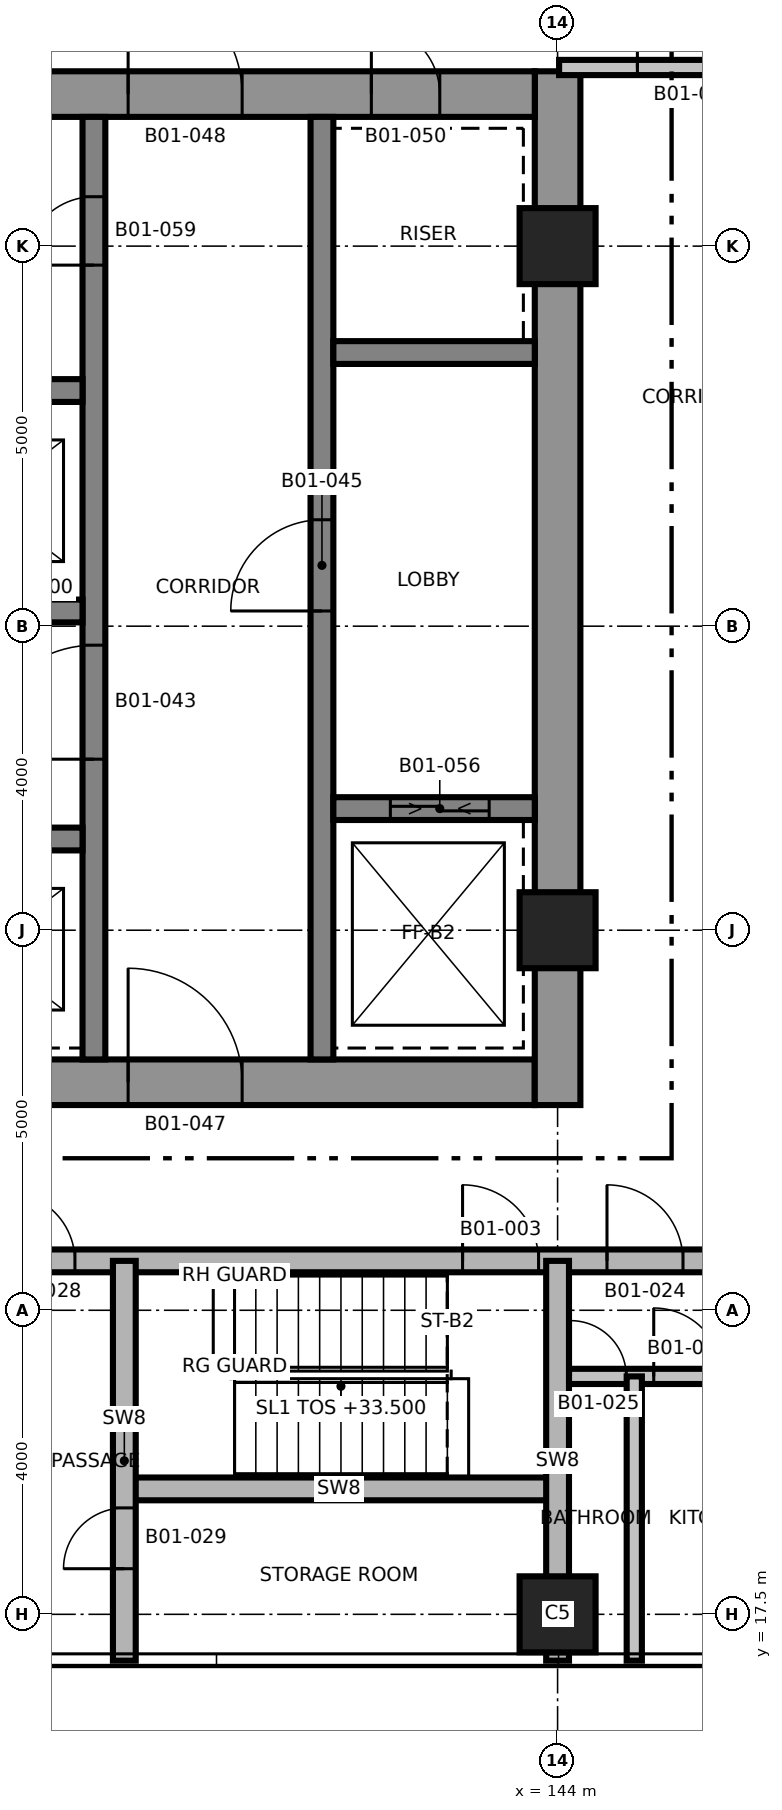
"""IFC4 building model, lengths in metres.
Left out: names, types, materials, properties, quantities, classifications, styles, units other than length and angle.
Written with IfcOpenShell. Run it as: python <this file> out.ifc"""

import sys

from ifc_helpers import new_model, si_unit, direction, frame, frame_2d, origin, origin_2d, place, context, subcontext, project, spatial, rectangle, extrude, element, fill, save


model = new_model("IFC4")
c1 = context("Model", 3, precision=1e-05, world=origin(), true_north=direction((0.0, 1.0)))
c2 = subcontext(c1, "Body", "Model", "MODEL_VIEW")
j1 = project(units=[si_unit("LENGTHUNIT", "METRE"), si_unit("PLANEANGLEUNIT", "RADIAN")], contexts=[c1])
p1 = place(None, origin())
s1 = spatial("IfcSite", under=j1, at=p1, CompositionType="ELEMENT")
p2 = place(p1, origin())
s2 = spatial("IfcBuilding", under=s1, at=p2, CompositionType="ELEMENT")
p3 = place(p2, frame((0.0, 0.0, 33.5)))
s3 = spatial("IfcBuildingStorey", under=s2, at=p3, CompositionType="ELEMENT", Elevation=33.5)
p4 = place(p3, frame((128.7, 24.5, 0.0), z_axis=(0.0, 0.0, 1.0), x_axis=(1.0, 0.0, 0.0)))
e1 = element("IfcWall", 1, at=p4, inside=s3, PredefinedType="SHEAR", context=c2, shape_type="SweptSolid", body=[
    extrude(rectangle(XDim=15.0, YDim=0.6, at=frame_2d((7.5, 0.0))), origin(), (0.0, 0.0, 1.0), 3.7),
])
p5 = place(p4, frame((9.65, 0.0, 0.0)))
e2 = element("IfcOpeningElement", 2, at=p5, cuts=e1, PredefinedType="OPENING", context=c2, shape_type="SweptSolid", body=[
    extrude(rectangle(XDim=1.5, YDim=2.1, at=frame_2d((0.75, 1.05))), frame((0.0, 0.31, 0.0), z_axis=(0.0, -1.0, 0.0), x_axis=(1.0, 0.0, 0.0)), (0.0, 0.0, 1.0), 0.62),
])
p6 = place(p4, frame((1.25, 0.0, 0.0)))
e3 = element("IfcOpeningElement", 3, at=p6, cuts=e1, PredefinedType="OPENING", context=c2, shape_type="SweptSolid", body=[
    extrude(rectangle(XDim=0.9, YDim=2.1, at=frame_2d((0.45, 1.05))), frame((0.0, 0.31, 0.0), z_axis=(0.0, -1.0, 0.0), x_axis=(1.0, 0.0, 0.0)), (0.0, 0.0, 1.0), 0.62),
])
p7 = place(p3, frame((144.0, 24.2, 0.0), z_axis=(0.0, 0.0, 1.0), x_axis=(0.0, 1.0, 0.0)))
e4 = element("IfcWall", 4, at=p7, inside=s3, PredefinedType="SHEAR", context=c2, shape_type="SweptSolid", body=[
    extrude(rectangle(XDim=13.6, YDim=0.6, at=frame_2d((6.8, 0.0))), origin(), (0.0, 0.0, 1.0), 3.7),
])
p8 = place(p3, frame((128.7, 37.5, 0.0), z_axis=(0.0, 0.0, 1.0), x_axis=(1.0, 0.0, 0.0)))
e5 = element("IfcWall", 5, at=p8, inside=s3, PredefinedType="SHEAR", context=c2, shape_type="SweptSolid", body=[
    extrude(rectangle(XDim=15.0, YDim=0.6, at=frame_2d((7.5, 0.0))), origin(), (0.0, 0.0, 1.0), 3.7),
])
p9 = place(p8, frame((9.65, 0.0, 0.0)))
e6 = element("IfcOpeningElement", 6, at=p9, cuts=e5, PredefinedType="OPENING", context=c2, shape_type="SweptSolid", body=[
    extrude(rectangle(XDim=1.5, YDim=2.1, at=frame_2d((0.75, 1.05))), frame((0.0, 0.31, 0.0), z_axis=(0.0, -1.0, 0.0), x_axis=(1.0, 0.0, 0.0)), (0.0, 0.0, 1.0), 0.62),
])
p10 = place(p8, frame((12.85, 0.0, 0.0)))
e7 = element("IfcOpeningElement", 7, at=p10, cuts=e5, PredefinedType="OPENING", context=c2, shape_type="SweptSolid", body=[
    extrude(rectangle(XDim=0.9, YDim=2.1, at=frame_2d((0.45, 1.05))), frame((0.0, 0.31, 0.0), z_axis=(0.0, -1.0, 0.0), x_axis=(1.0, 0.0, 0.0)), (0.0, 0.0, 1.0), 0.62),
])
p11 = place(p8, frame((4.3, 0.0, 0.0)))
e8 = element("IfcOpeningElement", 8, at=p11, cuts=e5, PredefinedType="OPENING", context=c2, shape_type="SweptSolid", body=[
    extrude(rectangle(XDim=0.9, YDim=2.1, at=frame_2d((0.45, 1.05))), frame((0.0, 0.31, 0.0), z_axis=(0.0, -1.0, 0.0), x_axis=(1.0, 0.0, 0.0)), (0.0, 0.0, 1.0), 0.62),
])
p12 = place(p8, frame((7.2, 0.0, 0.0)))
e9 = element("IfcOpeningElement", 9, at=p12, cuts=e5, PredefinedType="OPENING", context=c2, shape_type="SweptSolid", body=[
    extrude(rectangle(XDim=0.9, YDim=2.1, at=frame_2d((0.45, 1.05))), frame((0.0, 0.31, 0.0), z_axis=(0.0, -1.0, 0.0), x_axis=(1.0, 0.0, 0.0)), (0.0, 0.0, 1.0), 0.62),
])
p13 = place(p3, frame((137.9, 24.8, 0.0), z_axis=(0.0, 0.0, 1.0), x_axis=(0.0, 1.0, 0.0)))
e10 = element("IfcWall", 10, at=p13, inside=s3, PredefinedType="SHEAR", context=c2, shape_type="SweptSolid", body=[
    extrude(rectangle(XDim=12.4, YDim=0.3, at=frame_2d((6.2, 0.0))), origin(), (0.0, 0.0, 1.0), 3.7),
])
p14 = place(p13, frame((3.95, 0.0, 0.0)))
e11 = element("IfcOpeningElement", 11, at=p14, cuts=e10, PredefinedType="OPENING", context=c2, shape_type="SweptSolid", body=[
    extrude(rectangle(XDim=1.5, YDim=2.1, at=frame_2d((0.75, 1.05))), frame((0.0, 0.16, 0.0), z_axis=(0.0, -1.0, 0.0), x_axis=(1.0, 0.0, 0.0)), (0.0, 0.0, 1.0), 0.32),
])
p15 = place(p13, frame((10.45, 0.0, 0.0)))
e12 = element("IfcOpeningElement", 12, at=p15, cuts=e10, PredefinedType="OPENING", context=c2, shape_type="SweptSolid", body=[
    extrude(rectangle(XDim=0.9, YDim=2.1, at=frame_2d((0.45, 1.05))), frame((0.0, 0.16, 0.0), z_axis=(0.0, -1.0, 0.0), x_axis=(1.0, 0.0, 0.0)), (0.0, 0.0, 1.0), 0.32),
])
p16 = place(p3, frame((140.9, 24.8, 0.0), z_axis=(0.0, 0.0, 1.0), x_axis=(0.0, 1.0, 0.0)))
e13 = element("IfcWall", 13, at=p16, inside=s3, PredefinedType="SHEAR", context=c2, shape_type="SweptSolid", body=[
    extrude(rectangle(XDim=12.4, YDim=0.3, at=frame_2d((6.2, 0.0))), origin(), (0.0, 0.0, 1.0), 3.7),
])
p17 = place(p16, frame((5.9, 0.0, 0.0)))
e14 = element("IfcOpeningElement", 14, at=p17, cuts=e13, PredefinedType="OPENING", context=c2, shape_type="SweptSolid", body=[
    extrude(rectangle(XDim=1.2, YDim=2.1, at=frame_2d((0.6, 1.05))), frame((0.0, 0.16, 0.0), z_axis=(0.0, -1.0, 0.0), x_axis=(1.0, 0.0, 0.0)), (0.0, 0.0, 1.0), 0.32),
])
p18 = place(p3, frame((132.25, 27.7, 0.0), z_axis=(0.0, 0.0, 1.0), x_axis=(1.0, 0.0, 0.0)))
e15 = element("IfcWall", 15, at=p18, inside=s3, PredefinedType="SHEAR", context=c2, shape_type="SweptSolid", body=[
    extrude(rectangle(XDim=5.5, YDim=0.3, at=frame_2d((2.75, 0.0))), origin(), (0.0, 0.0, 1.0), 3.7),
])
p19 = place(p18, frame((0.9, 0.0, 0.0)))
e16 = element("IfcOpeningElement", 16, at=p19, cuts=e15, PredefinedType="OPENING", context=c2, shape_type="SweptSolid", body=[
    extrude(rectangle(XDim=1.1, YDim=2.4, at=frame_2d((0.55, 1.2))), frame((0.0, 0.16, 0.0), z_axis=(0.0, -1.0, 0.0), x_axis=(1.0, 0.0, 0.0)), (0.0, 0.0, 1.0), 0.32),
])
p20 = place(p18, frame((3.8, 0.0, 0.0)))
e17 = element("IfcOpeningElement", 17, at=p20, cuts=e15, PredefinedType="OPENING", context=c2, shape_type="SweptSolid", body=[
    extrude(rectangle(XDim=1.1, YDim=2.4, at=frame_2d((0.55, 1.2))), frame((0.0, 0.16, 0.0), z_axis=(0.0, -1.0, 0.0), x_axis=(1.0, 0.0, 0.0)), (0.0, 0.0, 1.0), 0.32),
])
p21 = place(p3, frame((132.25, 30.7, 0.0), z_axis=(0.0, 0.0, 1.0), x_axis=(1.0, 0.0, 0.0)))
e18 = element("IfcWall", 18, at=p21, inside=s3, PredefinedType="SHEAR", context=c2, shape_type="SweptSolid", body=[
    extrude(rectangle(XDim=5.5, YDim=0.3, at=frame_2d((2.75, 0.0))), origin(), (0.0, 0.0, 1.0), 3.7),
])
p22 = place(p21, frame((0.9, 0.0, 0.0)))
e19 = element("IfcOpeningElement", 19, at=p22, cuts=e18, PredefinedType="OPENING", context=c2, shape_type="SweptSolid", body=[
    extrude(rectangle(XDim=1.1, YDim=2.4, at=frame_2d((0.55, 1.2))), frame((0.0, 0.16, 0.0), z_axis=(0.0, -1.0, 0.0), x_axis=(1.0, 0.0, 0.0)), (0.0, 0.0, 1.0), 0.32),
])
p23 = place(p21, frame((3.8, 0.0, 0.0)))
e20 = element("IfcOpeningElement", 20, at=p23, cuts=e18, PredefinedType="OPENING", context=c2, shape_type="SweptSolid", body=[
    extrude(rectangle(XDim=1.1, YDim=2.4, at=frame_2d((0.55, 1.2))), frame((0.0, 0.16, 0.0), z_axis=(0.0, -1.0, 0.0), x_axis=(1.0, 0.0, 0.0)), (0.0, 0.0, 1.0), 0.32),
])
p24 = place(p3, frame((132.25, 33.6, 0.0), z_axis=(0.0, 0.0, 1.0), x_axis=(1.0, 0.0, 0.0)))
e21 = element("IfcWall", 21, at=p24, inside=s3, PredefinedType="SHEAR", context=c2, shape_type="SweptSolid", body=[
    extrude(rectangle(XDim=5.5, YDim=0.3, at=frame_2d((2.75, 0.0))), origin(), (0.0, 0.0, 1.0), 3.7),
])
p25 = place(p3, frame((141.05, 28.1, 0.0), z_axis=(0.0, 0.0, 1.0), x_axis=(1.0, 0.0, 0.0)))
e22 = element("IfcWall", 22, at=p25, inside=s3, PredefinedType="SHEAR", context=c2, shape_type="SweptSolid", body=[
    extrude(rectangle(XDim=2.65, YDim=0.3, at=frame_2d((1.325, 0.0))), origin(), (0.0, 0.0, 1.0), 3.7),
])
p26 = place(p25, frame((0.75, 0.0, 0.0)))
e23 = element("IfcOpeningElement", 23, at=p26, cuts=e22, PredefinedType="OPENING", context=c2, shape_type="SweptSolid", body=[
    extrude(rectangle(XDim=1.3, YDim=2.4, at=frame_2d((0.65, 1.2))), frame((0.0, 0.16, 0.0), z_axis=(0.0, -1.0, 0.0), x_axis=(1.0, 0.0, 0.0)), (0.0, 0.0, 1.0), 0.32),
])
p27 = place(p3, frame((141.05, 34.1, 0.0), z_axis=(0.0, 0.0, 1.0), x_axis=(1.0, 0.0, 0.0)))
e24 = element("IfcWall", 24, at=p27, inside=s3, PredefinedType="SHEAR", context=c2, shape_type="SweptSolid", body=[
    extrude(rectangle(XDim=2.65, YDim=0.3, at=frame_2d((1.325, 0.0))), origin(), (0.0, 0.0, 1.0), 3.7),
])
for number, where, z_axis, x_axis in (
    (25, (144.0, 17.5, 0.0), (0.0, 0.0, 1.0), (1.0, 0.0, 0.0)),
    (26, (144.0, 26.5, 0.0), (0.0, 0.0, 1.0), (1.0, 0.0, 0.0)),
    (27, (144.0, 35.5, 0.0), (0.0, 0.0, 1.0), (1.0, 0.0, 0.0)),
):
    element("IfcColumn", number, at=place(p3, frame(where, z_axis=z_axis, x_axis=x_axis)), inside=s3, PredefinedType="COLUMN", context=c2, shape_type="SweptSolid", body=[
        extrude(rectangle(XDim=1.0, YDim=1.0, at=origin_2d()), origin(), (0.0, 0.0, 1.0), 3.7),
    ])
p28 = place(p3, frame((138.25, 19.15, 0.0), z_axis=(0.0, 0.0, 1.0), x_axis=(1.0, 0.0, 0.0)))
e28 = element("IfcWall", 28, at=p28, inside=s3, PredefinedType="SHEAR", context=c2, shape_type="SweptSolid", body=[
    extrude(rectangle(XDim=5.75, YDim=0.3, at=frame_2d((2.875, 0.0))), origin(), (0.0, 0.0, 1.0), 3.4),
])
p29 = place(p3, frame((144.0, 20.63, 0.0), z_axis=(0.0, 0.0, 1.0), x_axis=(1.0, 0.0, 0.0)))
e29 = element("IfcWall", 29, at=p29, inside=s3, PredefinedType="PARTITIONING", context=c2, shape_type="SweptSolid", body=[
    extrude(rectangle(XDim=7.892, YDim=0.2, at=frame_2d((3.946, 0.0))), origin(), (0.0, 0.0, 1.0), 3.4),
])
p30 = place(p29, frame((0.17, 0.0, 0.0)))
e30 = element("IfcOpeningElement", 30, at=p30, cuts=e29, PredefinedType="OPENING", context=c2, shape_type="SweptSolid", body=[
    extrude(rectangle(XDim=0.734, YDim=2.1, at=frame_2d((0.367, 1.05))), frame((0.0, 0.11, 0.0), z_axis=(0.0, -1.0, 0.0), x_axis=(1.0, 0.0, 0.0)), (0.0, 0.0, 1.0), 0.22),
])
p31 = place(p29, frame((1.265, 0.0, 0.0)))
e31 = element("IfcOpeningElement", 31, at=p31, cuts=e29, PredefinedType="OPENING", context=c2, shape_type="SweptSolid", body=[
    extrude(rectangle(XDim=0.9, YDim=2.1, at=frame_2d((0.45, 1.05))), frame((0.0, 0.11, 0.0), z_axis=(0.0, -1.0, 0.0), x_axis=(1.0, 0.0, 0.0)), (0.0, 0.0, 1.0), 0.22),
])
p32 = place(p29, frame((4.708, 0.0, 0.0)))
e32 = element("IfcOpeningElement", 32, at=p32, cuts=e29, PredefinedType="OPENING", context=c2, shape_type="SweptSolid", body=[
    extrude(rectangle(XDim=0.9, YDim=2.1, at=frame_2d((0.45, 1.05))), frame((0.0, 0.11, 0.0), z_axis=(0.0, -1.0, 0.0), x_axis=(1.0, 0.0, 0.0)), (0.0, 0.0, 1.0), 0.22),
])
p33 = place(p3, frame((120.89, 22.15, 0.0), z_axis=(0.0, 0.0, 1.0), x_axis=(1.0, 0.0, 0.0)))
e33 = element("IfcWall", 33, at=p33, inside=s3, PredefinedType="SHEAR", context=c2, shape_type="SweptSolid", body=[
    extrude(rectangle(XDim=31.22, YDim=0.3, at=frame_2d((15.61, 0.0))), origin(), (0.0, 0.0, 1.0), 3.4),
])
p34 = place(p33, frame((21.86, 0.0, 0.0)))
e34 = element("IfcOpeningElement", 34, at=p34, cuts=e33, PredefinedType="OPENING", context=c2, shape_type="SweptSolid", body=[
    extrude(rectangle(XDim=1.0, YDim=2.1, at=frame_2d((0.5, 1.05))), frame((0.0, 0.16, 0.0), z_axis=(0.0, -1.0, 0.0), x_axis=(1.0, 0.0, 0.0)), (0.0, 0.0, 1.0), 0.32),
])
p35 = place(p33, frame((6.46, 0.0, 0.0)))
e35 = element("IfcOpeningElement", 35, at=p35, cuts=e33, PredefinedType="OPENING", context=c2, shape_type="SweptSolid", body=[
    extrude(rectangle(XDim=1.0, YDim=2.1, at=frame_2d((0.5, 1.05))), frame((0.0, 0.16, 0.0), z_axis=(0.0, -1.0, 0.0), x_axis=(1.0, 0.0, 0.0)), (0.0, 0.0, 1.0), 0.32),
])
p36 = place(p33, frame((11.36, 0.0, 0.0)))
e36 = element("IfcOpeningElement", 36, at=p36, cuts=e33, PredefinedType="OPENING", context=c2, shape_type="SweptSolid", body=[
    extrude(rectangle(XDim=1.0, YDim=2.1, at=frame_2d((0.5, 1.05))), frame((0.0, 0.16, 0.0), z_axis=(0.0, -1.0, 0.0), x_axis=(1.0, 0.0, 0.0)), (0.0, 0.0, 1.0), 0.32),
])
p37 = place(p33, frame((23.76, 0.0, 0.0)))
e37 = element("IfcOpeningElement", 37, at=p37, cuts=e33, PredefinedType="OPENING", context=c2, shape_type="SweptSolid", body=[
    extrude(rectangle(XDim=1.0, YDim=2.1, at=frame_2d((0.5, 1.05))), frame((0.0, 0.16, 0.0), z_axis=(0.0, -1.0, 0.0), x_axis=(1.0, 0.0, 0.0)), (0.0, 0.0, 1.0), 0.32),
])
p38 = place(p33, frame((15.86, 0.0, 0.0)))
e38 = element("IfcOpeningElement", 38, at=p38, cuts=e33, PredefinedType="OPENING", context=c2, shape_type="SweptSolid", body=[
    extrude(rectangle(XDim=0.9, YDim=2.1, at=frame_2d((0.45, 1.05))), frame((0.0, 0.16, 0.0), z_axis=(0.0, -1.0, 0.0), x_axis=(1.0, 0.0, 0.0)), (0.0, 0.0, 1.0), 0.32),
])
p39 = place(p3, frame((144.02, 37.85, 0.0), z_axis=(0.0, 0.0, 1.0), x_axis=(1.0, 0.0, 0.0)))
e39 = element("IfcWall", 39, at=p39, inside=s3, PredefinedType="PARTITIONING", context=c2, shape_type="SweptSolid", body=[
    extrude(rectangle(XDim=3.23, YDim=0.2, at=frame_2d((1.615, 0.0))), origin(), (0.0, 0.0, 1.0), 3.4),
])
p40 = place(p39, frame((1.03, 0.0, 0.0)))
e40 = element("IfcOpeningElement", 40, at=p40, cuts=e39, PredefinedType="OPENING", context=c2, shape_type="SweptSolid", body=[
    extrude(rectangle(XDim=1.5, YDim=2.1, at=frame_2d((0.75, 1.05))), frame((0.0, 0.11, 0.0), z_axis=(0.0, -1.0, 0.0), x_axis=(1.0, 0.0, 0.0)), (0.0, 0.0, 1.0), 0.22),
])
p41 = place(p3, frame((138.3, 16.89, 0.0), z_axis=(0.0, 0.0, 1.0), x_axis=(0.0, 1.0, 0.0)))
e41 = element("IfcWall", 41, at=p41, inside=s3, PredefinedType="SHEAR", context=c2, shape_type="SweptSolid", body=[
    extrude(rectangle(XDim=5.26, YDim=0.3, at=frame_2d((2.63, 0.0))), origin(), (0.0, 0.0, 1.0), 3.4),
])
p42 = place(p41, frame((1.21, 0.0, 0.0)))
e42 = element("IfcOpeningElement", 42, at=p42, cuts=e41, PredefinedType="OPENING", context=c2, shape_type="SweptSolid", body=[
    extrude(rectangle(XDim=0.8, YDim=2.1, at=frame_2d((0.4, 1.05))), frame((0.0, 0.16, 0.0), z_axis=(0.0, -1.0, 0.0), x_axis=(1.0, 0.0, 0.0)), (0.0, 0.0, 1.0), 0.32),
])
p43 = place(p3, frame((144.0, 16.89, 0.0), z_axis=(0.0, 0.0, 1.0), x_axis=(0.0, 1.0, 0.0)))
e43 = element("IfcWall", 43, at=p43, inside=s3, PredefinedType="SHEAR", context=c2, shape_type="SweptSolid", body=[
    extrude(rectangle(XDim=5.26, YDim=0.3, at=frame_2d((2.63, 0.0))), origin(), (0.0, 0.0, 1.0), 3.4),
])
p44 = place(p3, frame((145.009, 16.89, 0.0), z_axis=(0.0, 0.0, 1.0), x_axis=(0.0, 1.0, 0.0)))
e44 = element("IfcWall", 44, at=p44, inside=s3, PredefinedType="PARTITIONING", context=c2, shape_type="SweptSolid", body=[
    extrude(rectangle(XDim=3.74, YDim=0.2, at=frame_2d((1.87, 0.0))), origin(), (0.0, 0.0, 1.0), 3.4),
])
p45 = place(p40, origin())
e45 = element("IfcDoor", 45, at=p45, inside=s3, OperationType="SINGLE_SWING_LEFT", PredefinedType="DOOR", context=c2, shape_type="SweptSolid", body=[
    extrude(rectangle(XDim=1.5, YDim=2.1, at=frame_2d((0.75, 1.05))), frame((0.0, 0.025, 0.0), z_axis=(0.0, -1.0, 0.0), x_axis=(1.0, 0.0, 0.0)), (0.0, 0.0, 1.0), 0.05),
])
fill(e40, e45)
p46 = place(p34, origin())
e46 = element("IfcDoor", 46, at=p46, inside=s3, OperationType="SINGLE_SWING_LEFT", PredefinedType="DOOR", context=c2, shape_type="SweptSolid", body=[
    extrude(rectangle(XDim=1.0, YDim=2.1, at=frame_2d((0.5, 1.05))), frame((0.0, 0.025, 0.0), z_axis=(0.0, -1.0, 0.0), x_axis=(1.0, 0.0, 0.0)), (0.0, 0.0, 1.0), 0.05),
])
fill(e34, e46)
p47 = place(p37, origin())
e47 = element("IfcDoor", 47, at=p47, inside=s3, OperationType="SINGLE_SWING_RIGHT", PredefinedType="DOOR", context=c2, shape_type="SweptSolid", body=[
    extrude(rectangle(XDim=1.0, YDim=2.1, at=frame_2d((0.5, 1.05))), frame((0.0, 0.025, 0.0), z_axis=(0.0, -1.0, 0.0), x_axis=(1.0, 0.0, 0.0)), (0.0, 0.0, 1.0), 0.05),
])
fill(e37, e47)
p48 = place(p30, origin())
e48 = element("IfcDoor", 48, at=p48, inside=s3, OperationType="SINGLE_SWING_LEFT", PredefinedType="DOOR", context=c2, shape_type="SweptSolid", body=[
    extrude(rectangle(XDim=0.734, YDim=2.1, at=frame_2d((0.367, 1.05))), frame((0.0, 0.025, 0.0), z_axis=(0.0, -1.0, 0.0), x_axis=(1.0, 0.0, 0.0)), (0.0, 0.0, 1.0), 0.05),
])
fill(e30, e48)
p49 = place(p31, origin())
e49 = element("IfcDoor", 49, at=p49, inside=s3, OperationType="SINGLE_SWING_RIGHT", PredefinedType="DOOR", context=c2, shape_type="SweptSolid", body=[
    extrude(rectangle(XDim=0.9, YDim=2.1, at=frame_2d((0.45, 1.05))), frame((0.0, 0.025, 0.0), z_axis=(0.0, -1.0, 0.0), x_axis=(1.0, 0.0, 0.0)), (0.0, 0.0, 1.0), 0.05),
])
fill(e31, e49)
p50 = place(p38, origin())
e50 = element("IfcDoor", 50, at=p50, inside=s3, OperationType="SINGLE_SWING_RIGHT", PredefinedType="DOOR", context=c2, shape_type="SweptSolid", body=[
    extrude(rectangle(XDim=0.9, YDim=2.1, at=frame_2d((0.45, 1.05))), frame((0.0, 0.025, 0.0), z_axis=(0.0, -1.0, 0.0), x_axis=(1.0, 0.0, 0.0)), (0.0, 0.0, 1.0), 0.05),
])
fill(e38, e50)
p51 = place(p42, origin())
e51 = element("IfcDoor", 51, at=p51, inside=s3, OperationType="SINGLE_SWING_LEFT", PredefinedType="DOOR", context=c2, shape_type="SweptSolid", body=[
    extrude(rectangle(XDim=0.8, YDim=2.1, at=frame_2d((0.4, 1.05))), frame((0.0, 0.025, 0.0), z_axis=(0.0, -1.0, 0.0), x_axis=(1.0, 0.0, 0.0)), (0.0, 0.0, 1.0), 0.05),
])
fill(e42, e51)
p52 = place(p14, origin())
e52 = element("IfcDoor", 52, at=p52, inside=s3, OperationType="SINGLE_SWING_RIGHT", PredefinedType="DOOR", context=c2, shape_type="SweptSolid", body=[
    extrude(rectangle(XDim=1.5, YDim=2.1, at=frame_2d((0.75, 1.05))), frame((0.0, 0.025, 0.0), z_axis=(0.0, -1.0, 0.0), x_axis=(1.0, 0.0, 0.0)), (0.0, 0.0, 1.0), 0.05),
])
fill(e11, e52)
p53 = place(p17, origin())
e53 = element("IfcDoor", 53, at=p53, inside=s3, OperationType="SINGLE_SWING_RIGHT", PredefinedType="DOOR", context=c2, shape_type="SweptSolid", body=[
    extrude(rectangle(XDim=1.2, YDim=2.1, at=frame_2d((0.6, 1.05))), frame((0.0, 0.025, 0.0), z_axis=(0.0, -1.0, 0.0), x_axis=(1.0, 0.0, 0.0)), (0.0, 0.0, 1.0), 0.05),
])
fill(e14, e53)
p54 = place(p5, origin())
e54 = element("IfcDoor", 54, at=p54, inside=s3, OperationType="SINGLE_SWING_LEFT", PredefinedType="DOOR", context=c2, shape_type="SweptSolid", body=[
    extrude(rectangle(XDim=1.5, YDim=2.1, at=frame_2d((0.75, 1.05))), frame((0.0, 0.025, 0.0), z_axis=(0.0, -1.0, 0.0), x_axis=(1.0, 0.0, 0.0)), (0.0, 0.0, 1.0), 0.05),
])
fill(e2, e54)
p55 = place(p9, origin())
e55 = element("IfcDoor", 55, at=p55, inside=s3, OperationType="SINGLE_SWING_RIGHT", PredefinedType="DOOR", context=c2, shape_type="SweptSolid", body=[
    extrude(rectangle(XDim=1.5, YDim=2.1, at=frame_2d((0.75, 1.05))), frame((0.0, 0.025, 0.0), z_axis=(0.0, -1.0, 0.0), x_axis=(1.0, 0.0, 0.0)), (0.0, 0.0, 1.0), 0.05),
])
fill(e6, e55)
p56 = place(p10, origin())
e56 = element("IfcDoor", 56, at=p56, inside=s3, OperationType="SINGLE_SWING_RIGHT", PredefinedType="DOOR", context=c2, shape_type="SweptSolid", body=[
    extrude(rectangle(XDim=0.9, YDim=2.1, at=frame_2d((0.45, 1.05))), frame((0.0, 0.025, 0.0), z_axis=(0.0, -1.0, 0.0), x_axis=(1.0, 0.0, 0.0)), (0.0, 0.0, 1.0), 0.05),
])
fill(e7, e56)
p57 = place(p26, origin())
e57 = element("IfcDoor", 57, at=p57, inside=s3, OperationType="SLIDING_TO_LEFT", PredefinedType="DOOR", context=c2, shape_type="SweptSolid", body=[
    extrude(rectangle(XDim=1.3, YDim=2.4, at=frame_2d((0.65, 1.2))), frame((0.0, 0.025, 0.0), z_axis=(0.0, -1.0, 0.0), x_axis=(1.0, 0.0, 0.0)), (0.0, 0.0, 1.0), 0.05),
])
fill(e23, e57)
p58 = place(p15, origin())
e58 = element("IfcDoor", 58, at=p58, inside=s3, OperationType="SINGLE_SWING_RIGHT", PredefinedType="DOOR", context=c2, shape_type="SweptSolid", body=[
    extrude(rectangle(XDim=0.9, YDim=2.1, at=frame_2d((0.45, 1.05))), frame((0.0, 0.025, 0.0), z_axis=(0.0, -1.0, 0.0), x_axis=(1.0, 0.0, 0.0)), (0.0, 0.0, 1.0), 0.05),
])
fill(e12, e58)
save(model, sys.argv[1])
